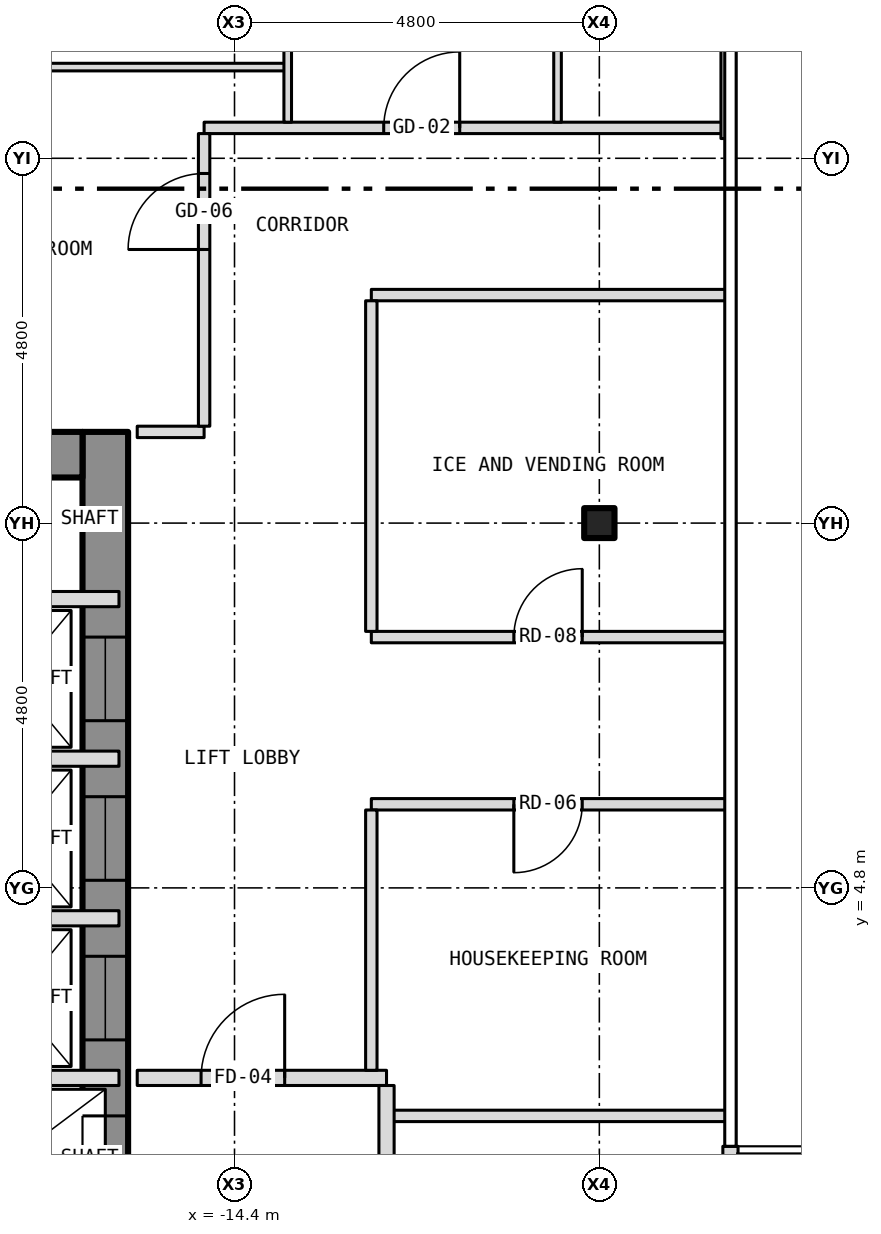
"""IFC4 building model, lengths in metres.
Left out: names, types, materials, properties, quantities, classifications, styles, units other than length and angle.
Written with IfcOpenShell. Run it as: python <this file> out.ifc"""

import sys

from ifc_helpers import new_model, si_unit, direction, frame, frame_2d, origin, origin_2d, place, context, subcontext, project, spatial, rectangle, i_section, extrude, element, fill, save


model = new_model("IFC4")
c1 = context("Model", 3, precision=1e-05, world=origin(), true_north=direction((0.0, 1.0)))
c2 = subcontext(c1, "Body", "Model", "MODEL_VIEW")
j1 = project(units=[si_unit("LENGTHUNIT", "METRE"), si_unit("PLANEANGLEUNIT", "RADIAN")], contexts=[c1])
p1 = place(None, origin())
s1 = spatial("IfcSite", under=j1, at=p1, CompositionType="ELEMENT")
p2 = place(p1, origin())
s2 = spatial("IfcBuilding", under=s1, at=p2, CompositionType="ELEMENT")
p3 = place(p2, frame((0.0, 0.0, 120.5)))
s3 = spatial("IfcBuildingStorey", under=s2, at=p3, CompositionType="ELEMENT", Elevation=120.5)
p4 = place(p3, frame((-9.6, 9.6, -0.15), z_axis=(0.0, 0.0, 1.0), x_axis=(1.0, 0.0, 0.0)))
e1 = element("IfcColumn", 1, at=p4, inside=s3, PredefinedType="COLUMN", context=c2, shape_type="SweptSolid", body=[
    extrude(i_section(OverallWidth=0.399, OverallDepth=0.394, WebThickness=0.023, FlangeThickness=0.037, at=origin_2d()), origin(), (0.0, 0.0, 1.0), 3.5),
])
p5 = place(p3, frame((-16.1, -10.8, 0.0), z_axis=(0.0, 0.0, 1.0), x_axis=(0.0, 1.0, 0.0)))
e2 = element("IfcWall", 2, at=p5, inside=s3, PredefinedType="SHEAR", context=c2, shape_type="SweptSolid", body=[
    extrude(rectangle(XDim=21.6, YDim=0.6, at=frame_2d((10.8, 0.0))), origin(), (0.0, 0.0, 1.0), 3.25),
])
p6 = place(p5, frame((9.4, 0.0, 0.0)))
e3 = element("IfcOpeningElement", 3, at=p6, cuts=e2, PredefinedType="OPENING", context=c2, shape_type="SweptSolid", body=[
    extrude(rectangle(XDim=1.1, YDim=2.1, at=frame_2d((0.55, 1.05))), frame((0.0, 0.312, 0.0), z_axis=(0.0, -1.0, 0.0), x_axis=(1.0, 0.0, 0.0)), (0.0, 0.0, 1.0), 0.624),
])
p7 = place(p5, frame((11.5, 0.0, 0.0)))
e4 = element("IfcOpeningElement", 4, at=p7, cuts=e2, PredefinedType="OPENING", context=c2, shape_type="SweptSolid", body=[
    extrude(rectangle(XDim=1.1, YDim=2.1, at=frame_2d((0.55, 1.05))), frame((0.0, 0.312, 0.0), z_axis=(0.0, -1.0, 0.0), x_axis=(1.0, 0.0, 0.0)), (0.0, 0.0, 1.0), 0.624),
])
p8 = place(p5, frame((13.6, 0.0, 0.0)))
e5 = element("IfcOpeningElement", 5, at=p8, cuts=e2, PredefinedType="OPENING", context=c2, shape_type="SweptSolid", body=[
    extrude(rectangle(XDim=1.1, YDim=2.1, at=frame_2d((0.55, 1.05))), frame((0.0, 0.312, 0.0), z_axis=(0.0, -1.0, 0.0), x_axis=(1.0, 0.0, 0.0)), (0.0, 0.0, 1.0), 0.624),
])
p9 = place(p5, frame((15.7, 0.0, 0.0)))
e6 = element("IfcOpeningElement", 6, at=p9, cuts=e2, PredefinedType="OPENING", context=c2, shape_type="SweptSolid", body=[
    extrude(rectangle(XDim=1.1, YDim=2.1, at=frame_2d((0.55, 1.05))), frame((0.0, 0.312, 0.0), z_axis=(0.0, -1.0, 0.0), x_axis=(1.0, 0.0, 0.0)), (0.0, 0.0, 1.0), 0.624),
])
p10 = place(p5, frame((17.8, 0.0, 0.0)))
e7 = element("IfcOpeningElement", 7, at=p10, cuts=e2, PredefinedType="OPENING", context=c2, shape_type="SweptSolid", body=[
    extrude(rectangle(XDim=1.1, YDim=2.1, at=frame_2d((0.55, 1.05))), frame((0.0, 0.312, 0.0), z_axis=(0.0, -1.0, 0.0), x_axis=(1.0, 0.0, 0.0)), (0.0, 0.0, 1.0), 0.624),
])
p11 = place(p5, frame((0.758, 0.0, 0.0)))
e8 = element("IfcOpeningElement", 8, at=p11, cuts=e2, PredefinedType="OPENING", context=c2, shape_type="SweptSolid", body=[
    extrude(rectangle(XDim=1.1, YDim=2.1, at=frame_2d((0.55, 1.05))), frame((0.0, 0.312, 0.0), z_axis=(0.0, -1.0, 0.0), x_axis=(1.0, 0.0, 0.0)), (0.0, 0.0, 1.0), 0.624),
])
p12 = place(p5, frame((7.5, 0.0, 0.0)))
e9 = element("IfcOpeningElement", 9, at=p12, cuts=e2, PredefinedType="OPENING", context=c2, shape_type="SweptSolid", body=[
    extrude(rectangle(XDim=1.1, YDim=2.1, at=frame_2d((0.55, 1.05))), frame((0.0, 0.312, 0.0), z_axis=(0.0, -1.0, 0.0), x_axis=(1.0, 0.0, 0.0)), (0.0, 0.0, 1.0), 0.624),
])
p13 = place(p3, frame((-22.2, 10.5, 0.0), z_axis=(0.0, 0.0, 1.0), x_axis=(1.0, 0.0, 0.0)))
e10 = element("IfcWall", 10, at=p13, inside=s3, PredefinedType="SHEAR", context=c2, shape_type="SweptSolid", body=[
    extrude(rectangle(XDim=5.8, YDim=0.6, at=frame_2d((2.9, 0.0))), origin(), (0.0, 0.0, 1.0), 3.25),
])
p14 = place(p3, frame((-7.875, -1.4, 0.0), z_axis=(0.0, 0.0, 1.0), x_axis=(0.0, 1.0, 0.0)))
e11 = element("IfcWall", 11, at=p14, inside=s3, PredefinedType="SOLIDWALL", context=c2, shape_type="SweptSolid", body=[
    extrude(rectangle(XDim=2.8, YDim=0.2, at=frame_2d((1.4, 0.0))), origin(), (0.0, 0.0, 1.0), 3.5),
])
p15 = place(p14, frame((0.5, 0.0, 0.0)))
e12 = element("IfcOpeningElement", 12, at=p15, cuts=e11, PredefinedType="OPENING", context=c2, shape_type="SweptSolid", body=[
    extrude(rectangle(XDim=1.8, YDim=2.1, at=frame_2d((0.9, 1.05))), frame((0.0, 0.112, 0.0), z_axis=(0.0, -1.0, 0.0), x_axis=(1.0, 0.0, 0.0)), (0.0, 0.0, 1.0), 0.224),
])
p16 = place(p3, frame((-12.4, 1.8, 0.0), z_axis=(0.0, 0.0, 1.0), x_axis=(1.0, 0.0, 0.0)))
e13 = element("IfcWall", 13, at=p16, inside=s3, PredefinedType="PARTITIONING", context=c2, shape_type="SweptSolid", body=[
    extrude(rectangle(XDim=4.48, YDim=0.15, at=frame_2d((2.24, 0.0))), origin(), (0.0, 0.0, 1.0), 3.35),
])
p17 = place(p3, frame((-18.8, 2.3, 0.0), z_axis=(0.0, 0.0, 1.0), x_axis=(1.0, 0.0, 0.0)))
e14 = element("IfcWall", 14, at=p17, inside=s3, PredefinedType="PARTITIONING", context=c2, shape_type="SweptSolid", body=[
    extrude(rectangle(XDim=2.88, YDim=0.2, at=frame_2d((1.44, 0.0))), origin(), (0.0, 0.0, 1.0), 3.25),
])
p18 = place(p3, frame((-15.68, 2.3, 0.0), z_axis=(0.0, 0.0, 1.0), x_axis=(1.0, 0.0, 0.0)))
e15 = element("IfcWall", 15, at=p18, inside=s3, PredefinedType="PARTITIONING", context=c2, shape_type="SweptSolid", body=[
    extrude(rectangle(XDim=3.28, YDim=0.2, at=frame_2d((1.64, 0.0))), origin(), (0.0, 0.0, 1.0), 3.35),
])
p19 = place(p18, frame((0.84, 0.0, 0.0)))
e16 = element("IfcOpeningElement", 16, at=p19, cuts=e15, PredefinedType="OPENING", context=c2, shape_type="SweptSolid", body=[
    extrude(rectangle(XDim=1.1, YDim=2.1, at=frame_2d((0.55, 1.05))), frame((0.0, 0.112, 0.0), z_axis=(0.0, -1.0, 0.0), x_axis=(1.0, 0.0, 0.0)), (0.0, 0.0, 1.0), 0.224),
])
p20 = place(p3, frame((-18.8, 4.4, 0.0), z_axis=(0.0, 0.0, 1.0), x_axis=(1.0, 0.0, 0.0)))
e17 = element("IfcWall", 17, at=p20, inside=s3, PredefinedType="PARTITIONING", context=c2, shape_type="SweptSolid", body=[
    extrude(rectangle(XDim=2.88, YDim=0.2, at=frame_2d((1.44, 0.0))), origin(), (0.0, 0.0, 1.0), 3.25),
])
p21 = place(p3, frame((-12.6, 5.9, 0.0), z_axis=(0.0, 0.0, 1.0), x_axis=(1.0, 0.0, 0.0)))
e18 = element("IfcWall", 18, at=p21, inside=s3, PredefinedType="PARTITIONING", context=c2, shape_type="SweptSolid", body=[
    extrude(rectangle(XDim=4.68, YDim=0.15, at=frame_2d((2.34, 0.0))), origin(), (0.0, 0.0, 1.0), 3.35),
])
p22 = place(p21, frame((1.875, 0.0, 0.0)))
e19 = element("IfcOpeningElement", 19, at=p22, cuts=e18, PredefinedType="OPENING", context=c2, shape_type="SweptSolid", body=[
    extrude(rectangle(XDim=0.9, YDim=2.1, at=frame_2d((0.45, 1.05))), frame((0.0, 0.087, 0.0), z_axis=(0.0, -1.0, 0.0), x_axis=(1.0, 0.0, 0.0)), (0.0, 0.0, 1.0), 0.174),
])
p23 = place(p3, frame((-18.8, 6.5, 0.0), z_axis=(0.0, 0.0, 1.0), x_axis=(1.0, 0.0, 0.0)))
e20 = element("IfcWall", 20, at=p23, inside=s3, PredefinedType="PARTITIONING", context=c2, shape_type="SweptSolid", body=[
    extrude(rectangle(XDim=2.88, YDim=0.2, at=frame_2d((1.44, 0.0))), origin(), (0.0, 0.0, 1.0), 3.25),
])
p24 = place(p3, frame((-12.6, 8.1, 0.0), z_axis=(0.0, 0.0, 1.0), x_axis=(1.0, 0.0, 0.0)))
e21 = element("IfcWall", 21, at=p24, inside=s3, PredefinedType="PARTITIONING", context=c2, shape_type="SweptSolid", body=[
    extrude(rectangle(XDim=4.68, YDim=0.15, at=frame_2d((2.34, 0.0))), origin(), (0.0, 0.0, 1.0), 3.35),
])
p25 = place(p24, frame((1.875, 0.0, 0.0)))
e22 = element("IfcOpeningElement", 22, at=p25, cuts=e21, PredefinedType="OPENING", context=c2, shape_type="SweptSolid", body=[
    extrude(rectangle(XDim=0.9, YDim=2.1, at=frame_2d((0.45, 1.05))), frame((0.0, 0.087, 0.0), z_axis=(0.0, -1.0, 0.0), x_axis=(1.0, 0.0, 0.0)), (0.0, 0.0, 1.0), 0.174),
])
p26 = place(p3, frame((-18.8, 8.6, 0.0), z_axis=(0.0, 0.0, 1.0), x_axis=(1.0, 0.0, 0.0)))
e23 = element("IfcWall", 23, at=p26, inside=s3, PredefinedType="PARTITIONING", context=c2, shape_type="SweptSolid", body=[
    extrude(rectangle(XDim=2.88, YDim=0.2, at=frame_2d((1.44, 0.0))), origin(), (0.0, 0.0, 1.0), 3.25),
])
p27 = place(p3, frame((-15.68, 10.8, 0.0), z_axis=(0.0, 0.0, 1.0), x_axis=(1.0, 0.0, 0.0)))
e24 = element("IfcWall", 24, at=p27, inside=s3, PredefinedType="PARTITIONING", context=c2, shape_type="SweptSolid", body=[
    extrude(rectangle(XDim=0.88, YDim=0.15, at=frame_2d((0.44, 0.0))), origin(), (0.0, 0.0, 1.0), 3.35),
])
p28 = place(p3, frame((-12.6, 12.6, 0.0), z_axis=(0.0, 0.0, 1.0), x_axis=(1.0, 0.0, 0.0)))
e25 = element("IfcWall", 25, at=p28, inside=s3, PredefinedType="PARTITIONING", context=c2, shape_type="SweptSolid", body=[
    extrude(rectangle(XDim=4.68, YDim=0.15, at=frame_2d((2.34, 0.0))), origin(), (0.0, 0.0, 1.0), 3.35),
])
p29 = place(p3, frame((-14.8, 14.8, 0.0), z_axis=(0.0, 0.0, 1.0), x_axis=(1.0, 0.0, 0.0)))
e26 = element("IfcWall", 26, at=p29, inside=s3, PredefinedType="PARTITIONING", context=c2, shape_type="SweptSolid", body=[
    extrude(rectangle(XDim=6.85, YDim=0.15, at=frame_2d((3.425, 0.0))), origin(), (0.0, 0.0, 1.0), 3.35),
])
p30 = place(p29, frame((2.363, 0.0, 0.0)))
e27 = element("IfcOpeningElement", 27, at=p30, cuts=e26, PredefinedType="OPENING", context=c2, shape_type="SweptSolid", body=[
    extrude(rectangle(XDim=1.0, YDim=2.1, at=frame_2d((0.5, 1.05))), frame((0.0, 0.087, 0.0), z_axis=(0.0, -1.0, 0.0), x_axis=(1.0, 0.0, 0.0)), (0.0, 0.0, 1.0), 0.174),
])
p31 = place(p3, frame((-23.28, 15.6, 0.0), z_axis=(0.0, 0.0, 1.0), x_axis=(1.0, 0.0, 0.0)))
e28 = element("IfcWall", 28, at=p31, inside=s3, PredefinedType="PARTITIONING", context=c2, shape_type="SweptSolid", body=[
    extrude(rectangle(XDim=9.58, YDim=0.1, at=frame_2d((4.79, 0.0))), origin(), (0.0, 0.0, 1.0), 3.35),
])
p32 = place(p31, frame((4.568, 0.0, 0.0)))
e29 = element("IfcOpeningElement", 29, at=p32, cuts=e28, PredefinedType="OPENING", context=c2, shape_type="SweptSolid", body=[
    extrude(rectangle(XDim=0.9, YDim=2.1, at=frame_2d((0.45, 1.05))), frame((0.0, 0.062, 0.0), z_axis=(0.0, -1.0, 0.0), x_axis=(1.0, 0.0, 0.0)), (0.0, 0.0, 1.0), 0.124),
])
p33 = place(p3, frame((-14.8, 10.875, 0.0), z_axis=(0.0, 0.0, 1.0), x_axis=(0.0, 1.0, 0.0)))
e30 = element("IfcWall", 30, at=p33, inside=s3, PredefinedType="PARTITIONING", context=c2, shape_type="SweptSolid", body=[
    extrude(rectangle(XDim=3.85, YDim=0.15, at=frame_2d((1.925, 0.0))), origin(), (0.0, 0.0, 1.0), 3.35),
])
p34 = place(p33, frame((2.325, 0.0, 0.0)))
e31 = element("IfcOpeningElement", 31, at=p34, cuts=e30, PredefinedType="OPENING", context=c2, shape_type="SweptSolid", body=[
    extrude(rectangle(XDim=1.0, YDim=2.1, at=frame_2d((0.5, 1.05))), frame((0.0, 0.087, 0.0), z_axis=(0.0, -1.0, 0.0), x_axis=(1.0, 0.0, 0.0)), (0.0, 0.0, 1.0), 0.174),
])
p35 = place(p3, frame((-13.7, 14.875, 0.0), z_axis=(0.0, 0.0, 1.0), x_axis=(0.0, 1.0, 0.0)))
e32 = element("IfcWall", 32, at=p35, inside=s3, PredefinedType="PARTITIONING", context=c2, shape_type="SweptSolid", body=[
    extrude(rectangle(XDim=7.805, YDim=0.1, at=frame_2d((3.902, 0.0))), origin(), (0.0, 0.0, 1.0), 3.35),
])
p36 = place(p3, frame((-12.6, 2.4, 0.0), z_axis=(0.0, 0.0, 1.0), x_axis=(0.0, 1.0, 0.0)))
e33 = element("IfcWall", 33, at=p36, inside=s3, PredefinedType="PARTITIONING", context=c2, shape_type="SweptSolid", body=[
    extrude(rectangle(XDim=3.425, YDim=0.15, at=frame_2d((1.712, 0.0))), origin(), (0.0, 0.0, 1.0), 3.35),
])
p37 = place(p3, frame((-12.6, 8.175, 0.0), z_axis=(0.0, 0.0, 1.0), x_axis=(0.0, 1.0, 0.0)))
e34 = element("IfcWall", 34, at=p37, inside=s3, PredefinedType="PARTITIONING", context=c2, shape_type="SweptSolid", body=[
    extrude(rectangle(XDim=4.35, YDim=0.15, at=frame_2d((2.175, 0.0))), origin(), (0.0, 0.0, 1.0), 3.35),
])
p38 = place(p3, frame((-12.4, -1.8, 0.0), z_axis=(0.0, 0.0, 1.0), x_axis=(0.0, 1.0, 0.0)))
e35 = element("IfcWall", 35, at=p38, inside=s3, PredefinedType="PARTITIONING", context=c2, shape_type="SweptSolid", body=[
    extrude(rectangle(XDim=4.0, YDim=0.2, at=frame_2d((2.0, 0.0))), origin(), (0.0, 0.0, 1.0), 3.35),
])
p39 = place(p38, frame((1.25, 0.0, 0.0)))
e36 = element("IfcOpeningElement", 36, at=p39, cuts=e35, PredefinedType="OPENING", context=c2, shape_type="SweptSolid", body=[
    extrude(rectangle(XDim=1.1, YDim=2.1, at=frame_2d((0.55, 1.05))), frame((0.0, 0.112, 0.0), z_axis=(0.0, -1.0, 0.0), x_axis=(1.0, 0.0, 0.0)), (0.0, 0.0, 1.0), 0.224),
])
p40 = place(p3, frame((-10.15, 14.875, 0.0), z_axis=(0.0, 0.0, 1.0), x_axis=(0.0, 1.0, 0.0)))
e37 = element("IfcWall", 37, at=p40, inside=s3, PredefinedType="PARTITIONING", context=c2, shape_type="SweptSolid", body=[
    extrude(rectangle(XDim=3.075, YDim=0.1, at=frame_2d((1.538, 0.0))), origin(), (0.0, 0.0, 1.0), 3.35),
])
p41 = place(p40, frame((1.971, 0.0, 0.0)))
e38 = element("IfcOpeningElement", 38, at=p41, cuts=e37, PredefinedType="OPENING", context=c2, shape_type="SweptSolid", body=[
    extrude(rectangle(XDim=0.9, YDim=2.1, at=frame_2d((0.45, 1.05))), frame((0.0, 0.062, 0.0), z_axis=(0.0, -1.0, 0.0), x_axis=(1.0, 0.0, 0.0)), (0.0, 0.0, 1.0), 0.124),
])
p42 = place(p3, frame((-7.95, 14.66, 0.0), z_axis=(0.0, 0.0, 1.0), x_axis=(0.0, 1.0, 0.0)))
e39 = element("IfcWall", 39, at=p42, inside=s3, PredefinedType="PARTITIONING", context=c2, shape_type="SweptSolid", body=[
    extrude(rectangle(XDim=3.48, YDim=0.1, at=frame_2d((1.74, 0.0))), origin(), (0.0, 0.0, 1.0), 2.733),
])
p43 = place(p7, origin())
e40 = element("IfcDoor", 40, at=p43, inside=s3, OperationType="SLIDING_TO_LEFT", PredefinedType="DOOR", context=c2, shape_type="SweptSolid", body=[
    extrude(rectangle(XDim=1.1, YDim=2.1, at=frame_2d((0.55, 1.05))), frame((0.0, 0.025, 0.0), z_axis=(0.0, -1.0, 0.0), x_axis=(1.0, 0.0, 0.0)), (0.0, 0.0, 1.0), 0.05),
])
fill(e4, e40)
p44 = place(p8, origin())
e41 = element("IfcDoor", 41, at=p44, inside=s3, OperationType="SLIDING_TO_LEFT", PredefinedType="DOOR", context=c2, shape_type="SweptSolid", body=[
    extrude(rectangle(XDim=1.1, YDim=2.1, at=frame_2d((0.55, 1.05))), frame((0.0, 0.025, 0.0), z_axis=(0.0, -1.0, 0.0), x_axis=(1.0, 0.0, 0.0)), (0.0, 0.0, 1.0), 0.05),
])
fill(e5, e41)
p45 = place(p9, origin())
e42 = element("IfcDoor", 42, at=p45, inside=s3, OperationType="SLIDING_TO_LEFT", PredefinedType="DOOR", context=c2, shape_type="SweptSolid", body=[
    extrude(rectangle(XDim=1.1, YDim=2.1, at=frame_2d((0.55, 1.05))), frame((0.0, 0.025, 0.0), z_axis=(0.0, -1.0, 0.0), x_axis=(1.0, 0.0, 0.0)), (0.0, 0.0, 1.0), 0.05),
])
fill(e6, e42)
p46 = place(p10, origin())
e43 = element("IfcDoor", 43, at=p46, inside=s3, OperationType="SLIDING_TO_LEFT", PredefinedType="DOOR", context=c2, shape_type="SweptSolid", body=[
    extrude(rectangle(XDim=1.1, YDim=2.1, at=frame_2d((0.55, 1.05))), frame((0.0, 0.025, 0.0), z_axis=(0.0, -1.0, 0.0), x_axis=(1.0, 0.0, 0.0)), (0.0, 0.0, 1.0), 0.05),
])
fill(e7, e43)
p47 = place(p19, origin())
e44 = element("IfcDoor", 44, at=p47, inside=s3, OperationType="SINGLE_SWING_RIGHT", PredefinedType="DOOR", context=c2, shape_type="SweptSolid", body=[
    extrude(rectangle(XDim=1.1, YDim=2.1, at=frame_2d((0.55, 1.05))), frame((0.0, 0.025, 0.0), z_axis=(0.0, -1.0, 0.0), x_axis=(1.0, 0.0, 0.0)), (0.0, 0.0, 1.0), 0.05),
])
fill(e16, e44)
p48 = place(p30, origin())
e45 = element("IfcDoor", 45, at=p48, inside=s3, OperationType="SINGLE_SWING_RIGHT", PredefinedType="DOOR", context=c2, shape_type="SweptSolid", body=[
    extrude(rectangle(XDim=1.0, YDim=2.1, at=frame_2d((0.5, 1.05))), frame((0.0, 0.025, 0.0), z_axis=(0.0, -1.0, 0.0), x_axis=(1.0, 0.0, 0.0)), (0.0, 0.0, 1.0), 0.05),
])
fill(e27, e45)
p49 = place(p34, origin())
e46 = element("IfcDoor", 46, at=p49, inside=s3, OperationType="SINGLE_SWING_LEFT", PredefinedType="DOOR", context=c2, shape_type="SweptSolid", body=[
    extrude(rectangle(XDim=1.0, YDim=2.1, at=frame_2d((0.5, 1.05))), frame((0.0, 0.025, 0.0), z_axis=(0.0, -1.0, 0.0), x_axis=(1.0, 0.0, 0.0)), (0.0, 0.0, 1.0), 0.05),
])
fill(e31, e46)
p50 = place(p22, origin())
e47 = element("IfcDoor", 47, at=p50, inside=s3, OperationType="SINGLE_SWING_LEFT", PredefinedType="DOOR", context=c2, shape_type="SweptSolid", body=[
    extrude(rectangle(XDim=0.9, YDim=2.1, at=frame_2d((0.45, 1.05))), frame((0.0, 0.025, 0.0), z_axis=(0.0, -1.0, 0.0), x_axis=(1.0, 0.0, 0.0)), (0.0, 0.0, 1.0), 0.05),
])
fill(e19, e47)
p51 = place(p25, origin())
e48 = element("IfcDoor", 48, at=p51, inside=s3, OperationType="SINGLE_SWING_RIGHT", PredefinedType="DOOR", context=c2, shape_type="SweptSolid", body=[
    extrude(rectangle(XDim=0.9, YDim=2.1, at=frame_2d((0.45, 1.05))), frame((0.0, 0.025, 0.0), z_axis=(0.0, -1.0, 0.0), x_axis=(1.0, 0.0, 0.0)), (0.0, 0.0, 1.0), 0.05),
])
fill(e22, e48)
save(model, sys.argv[1])
